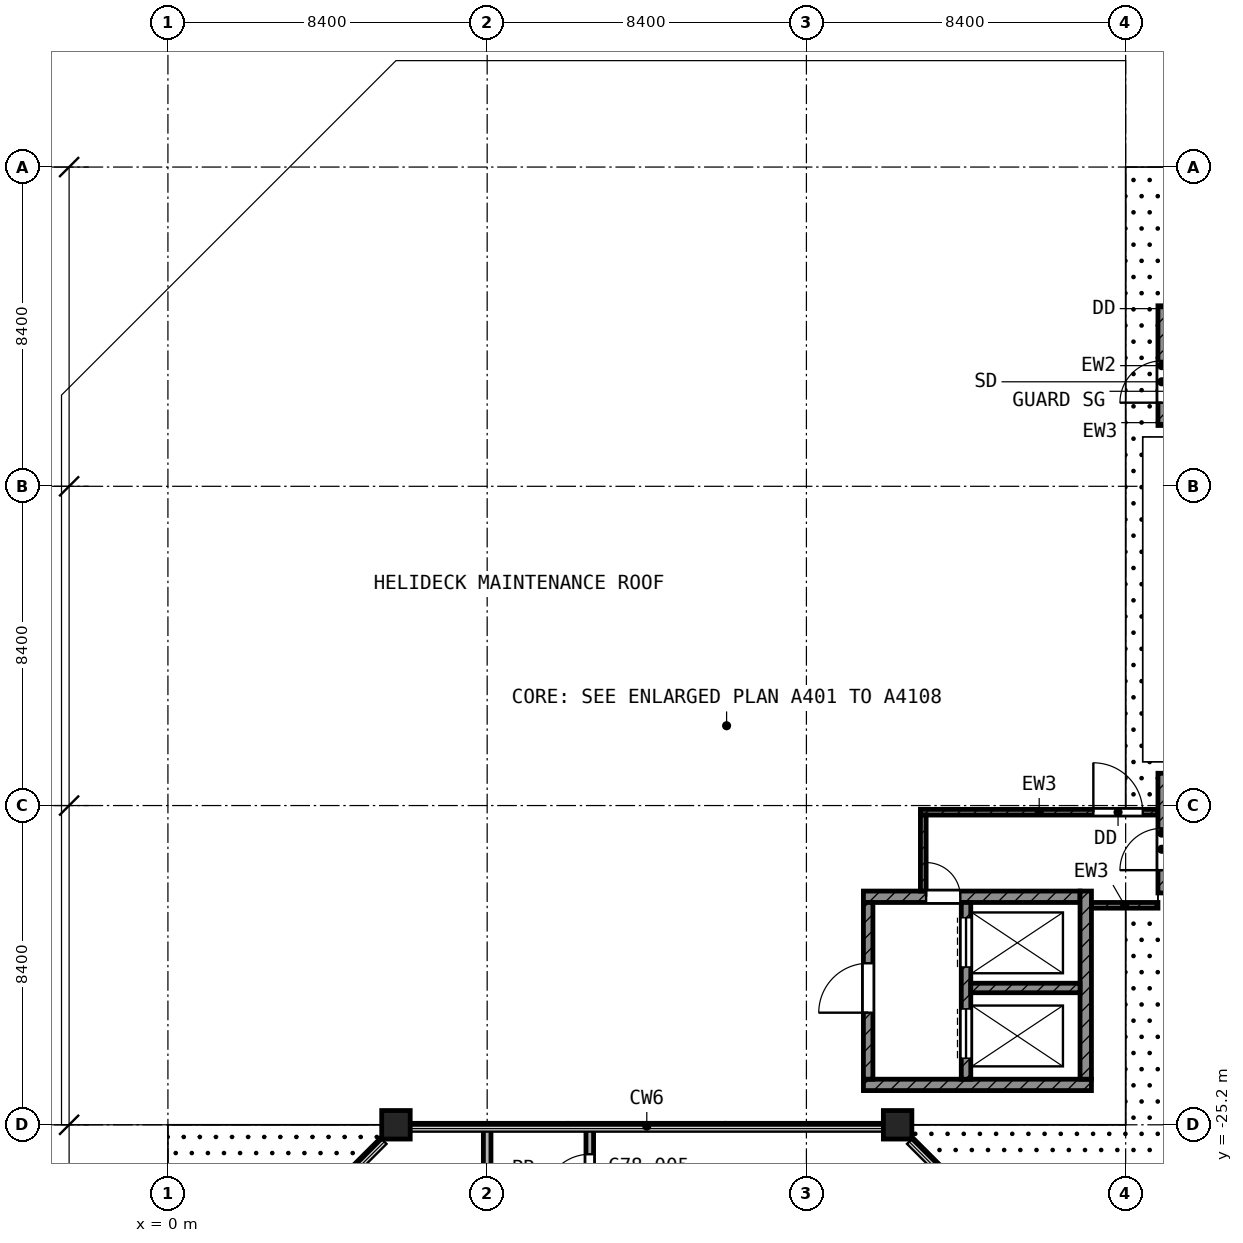
"""IFC4 building model, lengths in metres.
Left out: names, types, materials, properties, quantities, classifications, styles, units other than length and angle.
Written with IfcOpenShell. Run it as: python <this file> out.ifc"""

import sys

from ifc_helpers import new_model, si_unit, direction, frame, frame_2d, origin, origin_2d, place, context, subcontext, project, spatial, rectangle, extrude, element, fill, save


model = new_model("IFC4")
c1 = context("Model", 3, precision=1e-05, world=origin(), true_north=direction((0.0, 1.0)))
c2 = subcontext(c1, "Body", "Model", "MODEL_VIEW")
j1 = project(units=[si_unit("LENGTHUNIT", "METRE"), si_unit("PLANEANGLEUNIT", "RADIAN")], contexts=[c1])
p1 = place(None, origin())
s1 = spatial("IfcSite", under=j1, at=p1, CompositionType="ELEMENT")
p2 = place(p1, origin())
s2 = spatial("IfcBuilding", under=s1, at=p2, CompositionType="ELEMENT")
p3 = place(p2, frame((0.0, 0.0, 336.7)))
s3 = spatial("IfcBuildingStorey", under=s2, at=p3, CompositionType="ELEMENT", Elevation=336.7)
for number, where, z_axis, x_axis in (
    (1, (6.0, -25.2, 0.0), (0.0, 0.0, 1.0), (1.0, 0.0, 0.0)),
    (2, (19.2, -25.2, 0.0), (0.0, 0.0, 1.0), (1.0, 0.0, 0.0)),
):
    element("IfcColumn", number, at=place(p3, frame(where, z_axis=z_axis, x_axis=x_axis)), inside=s3, PredefinedType="COLUMN", context=c2, shape_type="SweptSolid", body=[
        extrude(rectangle(XDim=0.75, YDim=0.75, at=origin_2d()), origin(), (0.0, 0.0, 1.0), 4.5),
    ])
p4 = place(p3, frame((26.15, -19.1, 0.0), z_axis=(0.0, 0.0, 1.0), x_axis=(0.0, 1.0, 0.0)))
e3 = element("IfcWall", 3, at=p4, inside=s3, PredefinedType="SHEAR", context=c2, shape_type="SweptSolid", body=[
    extrude(rectangle(XDim=3.15, YDim=0.2, at=frame_2d((1.575, 0.0))), origin(), (0.0, 0.0, 1.0), 4.2),
])
p5 = place(p4, frame((0.6, 0.0, 0.0)))
e4 = element("IfcOpeningElement", 4, at=p5, cuts=e3, PredefinedType="OPENING", context=c2, shape_type="SweptSolid", body=[
    extrude(rectangle(XDim=1.1, YDim=2.1, at=frame_2d((0.55, 1.05))), frame((0.0, 0.11, 0.0), z_axis=(0.0, -1.0, 0.0), x_axis=(1.0, 0.0, 0.0)), (0.0, 0.0, 1.0), 0.22),
])
p6 = place(p3, frame((26.15, -6.8, 0.0), z_axis=(0.0, 0.0, 1.0), x_axis=(0.0, 1.0, 0.0)))
e5 = element("IfcWall", 5, at=p6, inside=s3, PredefinedType="SHEAR", context=c2, shape_type="SweptSolid", body=[
    extrude(rectangle(XDim=3.15, YDim=0.2, at=frame_2d((1.575, 0.0))), origin(), (0.0, 0.0, 1.0), 4.2),
])
p7 = place(p6, frame((0.6, 0.0, 0.0)))
e6 = element("IfcOpeningElement", 6, at=p7, cuts=e5, PredefinedType="OPENING", context=c2, shape_type="SweptSolid", body=[
    extrude(rectangle(XDim=1.1, YDim=2.1, at=frame_2d((0.55, 1.05))), frame((0.0, 0.11, 0.0), z_axis=(0.0, -1.0, 0.0), x_axis=(1.0, 0.0, 0.0)), (0.0, 0.0, 1.0), 0.22),
])
p8 = place(p3, frame((18.3, -24.15, 0.0), z_axis=(0.0, 0.0, 1.0), x_axis=(1.0, 0.0, 0.0)))
e7 = element("IfcWall", 7, at=p8, inside=s3, PredefinedType="SHEAR", context=c2, shape_type="SweptSolid", body=[
    extrude(rectangle(XDim=6.0, YDim=0.3, at=frame_2d((3.0, 0.0))), origin(), (0.0, 0.0, 1.0), 4.2),
])
p9 = place(p3, frame((24.15, -24.0, 0.0), z_axis=(0.0, 0.0, 1.0), x_axis=(0.0, 1.0, 0.0)))
e8 = element("IfcWall", 8, at=p9, inside=s3, PredefinedType="SHEAR", context=c2, shape_type="SweptSolid", body=[
    extrude(rectangle(XDim=4.95, YDim=0.3, at=frame_2d((2.475, 0.0))), origin(), (0.0, 0.0, 1.0), 4.2),
])
p10 = place(p3, frame((18.3, -19.2, 0.0), z_axis=(0.0, 0.0, 1.0), x_axis=(1.0, 0.0, 0.0)))
e9 = element("IfcWall", 9, at=p10, inside=s3, PredefinedType="SHEAR", context=c2, shape_type="SweptSolid", body=[
    extrude(rectangle(XDim=5.7, YDim=0.3, at=frame_2d((2.85, 0.0))), origin(), (0.0, 0.0, 1.0), 4.2),
])
p11 = place(p10, frame((1.65, 0.0, 0.0)))
e10 = element("IfcOpeningElement", 10, at=p11, cuts=e9, PredefinedType="OPENING", context=c2, shape_type="SweptSolid", body=[
    extrude(rectangle(XDim=0.9, YDim=2.1, at=frame_2d((0.45, 1.05))), frame((0.0, 0.16, 0.0), z_axis=(0.0, -1.0, 0.0), x_axis=(1.0, 0.0, 0.0)), (0.0, 0.0, 1.0), 0.32),
])
p12 = place(p3, frame((18.425, -24.0, 0.0), z_axis=(0.0, 0.0, 1.0), x_axis=(0.0, 1.0, 0.0)))
e11 = element("IfcWall", 11, at=p12, inside=s3, PredefinedType="SHEAR", context=c2, shape_type="SweptSolid", body=[
    extrude(rectangle(XDim=4.65, YDim=0.25, at=frame_2d((2.325, 0.0))), origin(), (0.0, 0.0, 1.0), 4.2),
])
p13 = place(p12, frame((1.75, 0.0, 0.0)))
e12 = element("IfcOpeningElement", 12, at=p13, cuts=e11, PredefinedType="OPENING", context=c2, shape_type="SweptSolid", body=[
    extrude(rectangle(XDim=1.3, YDim=2.1, at=frame_2d((0.65, 1.05))), frame((0.0, 0.135, 0.0), z_axis=(0.0, -1.0, 0.0), x_axis=(1.0, 0.0, 0.0)), (0.0, 0.0, 1.0), 0.27),
])
p14 = place(p3, frame((21.0, -24.0, 0.0), z_axis=(0.0, 0.0, 1.0), x_axis=(0.0, 1.0, 0.0)))
e13 = element("IfcWall", 13, at=p14, inside=s3, PredefinedType="SHEAR", context=c2, shape_type="SweptSolid", body=[
    extrude(rectangle(XDim=4.65, YDim=0.25, at=frame_2d((2.325, 0.0))), origin(), (0.0, 0.0, 1.0), 4.2),
])
p15 = place(p14, frame((2.95, 0.0, 0.0)))
e14 = element("IfcOpeningElement", 14, at=p15, cuts=e13, PredefinedType="OPENING", context=c2, shape_type="SweptSolid", body=[
    extrude(rectangle(XDim=1.3, YDim=2.1, at=frame_2d((0.65, 1.05))), frame((0.0, 0.135, 0.0), z_axis=(0.0, -1.0, 0.0), x_axis=(1.0, 0.0, 0.0)), (0.0, 0.0, 1.0), 0.27),
])
p16 = place(p14, frame((0.55, 0.0, 0.0)))
e15 = element("IfcOpeningElement", 15, at=p16, cuts=e13, PredefinedType="OPENING", context=c2, shape_type="SweptSolid", body=[
    extrude(rectangle(XDim=1.3, YDim=2.1, at=frame_2d((0.65, 1.05))), frame((0.0, 0.135, 0.0), z_axis=(0.0, -1.0, 0.0), x_axis=(1.0, 0.0, 0.0)), (0.0, 0.0, 1.0), 0.27),
])
p17 = place(p3, frame((21.125, -21.6, 0.0), z_axis=(0.0, 0.0, 1.0), x_axis=(1.0, 0.0, 0.0)))
e16 = element("IfcWall", 16, at=p17, inside=s3, PredefinedType="SHEAR", context=c2, shape_type="SweptSolid", body=[
    extrude(rectangle(XDim=2.875, YDim=0.25, at=frame_2d((1.438, 0.0))), origin(), (0.0, 0.0, 1.0), 4.2),
])
p18 = place(p3, frame((19.8, -16.975, 0.0), z_axis=(0.0, 0.0, 1.0), x_axis=(1.0, 0.0, 0.0)))
e17 = element("IfcWall", 17, at=p18, inside=s3, PredefinedType="SHEAR", context=c2, shape_type="SweptSolid", body=[
    extrude(rectangle(XDim=6.25, YDim=0.15, at=frame_2d((3.125, 0.0))), origin(), (0.0, 0.0, 1.0), 4.2),
])
p19 = place(p18, frame((4.55, 0.0, 0.0)))
e18 = element("IfcOpeningElement", 18, at=p19, cuts=e17, PredefinedType="OPENING", context=c2, shape_type="SweptSolid", body=[
    extrude(rectangle(XDim=1.3, YDim=2.1, at=frame_2d((0.65, 1.05))), frame((0.0, 0.085, 0.0), z_axis=(0.0, -1.0, 0.0), x_axis=(1.0, 0.0, 0.0)), (0.0, 0.0, 1.0), 0.17),
])
p20 = place(p3, frame((19.875, -19.05, 0.0), z_axis=(0.0, 0.0, 1.0), x_axis=(0.0, 1.0, 0.0)))
e19 = element("IfcWall", 19, at=p20, inside=s3, PredefinedType="SHEAR", context=c2, shape_type="SweptSolid", body=[
    extrude(rectangle(XDim=2.0, YDim=0.15, at=frame_2d((1.0, 0.0))), origin(), (0.0, 0.0, 1.0), 4.2),
])
p21 = place(p3, frame((24.3, -19.425, 0.0), z_axis=(0.0, 0.0, 1.0), x_axis=(1.0, 0.0, 0.0)))
e20 = element("IfcWall", 20, at=p21, inside=s3, PredefinedType="SHEAR", context=c2, shape_type="SweptSolid", body=[
    extrude(rectangle(XDim=1.75, YDim=0.15, at=frame_2d((0.875, 0.0))), origin(), (0.0, 0.0, 1.0), 4.2),
])
p22 = place(p3, frame((8.4, -27.95, 0.0), z_axis=(0.0, 0.0, 1.0), x_axis=(0.0, 1.0, 0.0)))
e21 = element("IfcWall", 21, at=p22, inside=s3, PredefinedType="PARTITIONING", context=c2, shape_type="SweptSolid", body=[
    extrude(rectangle(XDim=2.67, YDim=0.2, at=frame_2d((1.335, 0.0))), origin(), (0.0, 0.0, 1.0), 4.2),
])
p23 = place(p3, frame((11.1, -27.95, 0.0), z_axis=(0.0, 0.0, 1.0), x_axis=(0.0, 1.0, 0.0)))
e22 = element("IfcWall", 22, at=p23, inside=s3, PredefinedType="PARTITIONING", context=c2, shape_type="SweptSolid", body=[
    extrude(rectangle(XDim=2.67, YDim=0.2, at=frame_2d((1.335, 0.0))), origin(), (0.0, 0.0, 1.0), 4.2),
])
p24 = place(p23, frame((0.775, 0.0, 0.0)))
e23 = element("IfcOpeningElement", 23, at=p24, cuts=e22, PredefinedType="OPENING", context=c2, shape_type="SweptSolid", body=[
    extrude(rectangle(XDim=1.2, YDim=2.1, at=frame_2d((0.6, 1.05))), frame((0.0, 0.11, 0.0), z_axis=(0.0, -1.0, 0.0), x_axis=(1.0, 0.0, 0.0)), (0.0, 0.0, 1.0), 0.22),
])
p25 = place(p5, origin())
e24 = element("IfcDoor", 24, at=p25, inside=s3, OperationType="SINGLE_SWING_LEFT", PredefinedType="DOOR", context=c2, shape_type="SweptSolid", body=[
    extrude(rectangle(XDim=1.1, YDim=2.1, at=frame_2d((0.55, 1.05))), frame((0.0, 0.025, 0.0), z_axis=(0.0, -1.0, 0.0), x_axis=(1.0, 0.0, 0.0)), (0.0, 0.0, 1.0), 0.05),
])
fill(e4, e24)
p26 = place(p7, origin())
e25 = element("IfcDoor", 25, at=p26, inside=s3, OperationType="SINGLE_SWING_LEFT", PredefinedType="DOOR", context=c2, shape_type="SweptSolid", body=[
    extrude(rectangle(XDim=1.1, YDim=2.1, at=frame_2d((0.55, 1.05))), frame((0.0, 0.025, 0.0), z_axis=(0.0, -1.0, 0.0), x_axis=(1.0, 0.0, 0.0)), (0.0, 0.0, 1.0), 0.05),
])
fill(e6, e25)
p27 = place(p11, origin())
e26 = element("IfcDoor", 26, at=p27, inside=s3, OperationType="SINGLE_SWING_LEFT", PredefinedType="DOOR", context=c2, shape_type="SweptSolid", body=[
    extrude(rectangle(XDim=0.9, YDim=2.1, at=frame_2d((0.45, 1.05))), frame((0.0, 0.025, 0.0), z_axis=(0.0, -1.0, 0.0), x_axis=(1.0, 0.0, 0.0)), (0.0, 0.0, 1.0), 0.05),
])
fill(e10, e26)
p28 = place(p19, origin())
e27 = element("IfcDoor", 27, at=p28, inside=s3, OperationType="SINGLE_SWING_LEFT", PredefinedType="DOOR", context=c2, shape_type="SweptSolid", body=[
    extrude(rectangle(XDim=1.3, YDim=2.1, at=frame_2d((0.65, 1.05))), frame((0.0, 0.025, 0.0), z_axis=(0.0, -1.0, 0.0), x_axis=(1.0, 0.0, 0.0)), (0.0, 0.0, 1.0), 0.05),
])
fill(e18, e27)
p29 = place(p13, origin())
e28 = element("IfcDoor", 28, at=p29, inside=s3, OperationType="SINGLE_SWING_LEFT", PredefinedType="DOOR", context=c2, shape_type="SweptSolid", body=[
    extrude(rectangle(XDim=1.3, YDim=2.1, at=frame_2d((0.65, 1.05))), frame((0.0, 0.025, 0.0), z_axis=(0.0, -1.0, 0.0), x_axis=(1.0, 0.0, 0.0)), (0.0, 0.0, 1.0), 0.05),
])
fill(e12, e28)
p30 = place(p15, origin())
e29 = element("IfcDoor", 29, at=p30, inside=s3, OperationType="DOUBLE_DOOR_SLIDING", PredefinedType="DOOR", context=c2, shape_type="SweptSolid", body=[
    extrude(rectangle(XDim=1.3, YDim=2.1, at=frame_2d((0.65, 1.05))), frame((0.0, 0.025, 0.0), z_axis=(0.0, -1.0, 0.0), x_axis=(1.0, 0.0, 0.0)), (0.0, 0.0, 1.0), 0.05),
])
fill(e14, e29)
p31 = place(p16, origin())
e30 = element("IfcDoor", 30, at=p31, inside=s3, OperationType="DOUBLE_DOOR_SLIDING", PredefinedType="DOOR", context=c2, shape_type="SweptSolid", body=[
    extrude(rectangle(XDim=1.3, YDim=2.1, at=frame_2d((0.65, 1.05))), frame((0.0, 0.025, 0.0), z_axis=(0.0, -1.0, 0.0), x_axis=(1.0, 0.0, 0.0)), (0.0, 0.0, 1.0), 0.05),
])
fill(e15, e30)
p32 = place(p24, origin())
e31 = element("IfcDoor", 31, at=p32, inside=s3, OperationType="SINGLE_SWING_LEFT", PredefinedType="DOOR", context=c2, shape_type="SweptSolid", body=[
    extrude(rectangle(XDim=1.2, YDim=2.1, at=frame_2d((0.6, 1.05))), frame((0.0, 0.025, 0.0), z_axis=(0.0, -1.0, 0.0), x_axis=(1.0, 0.0, 0.0)), (0.0, 0.0, 1.0), 0.05),
])
fill(e23, e31)
save(model, sys.argv[1])
